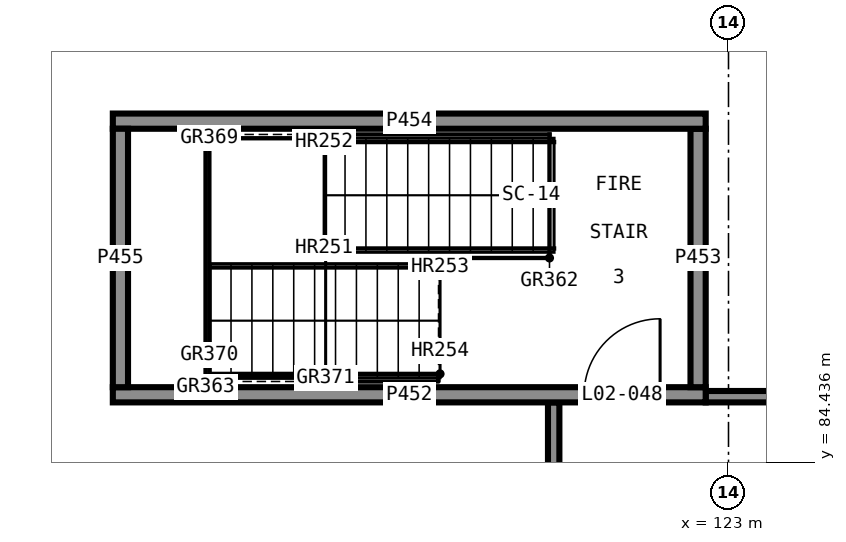
"""IFC4 building model, lengths in metres.
Left out: names, types, materials, properties, quantities, classifications, styles, units other than length and angle.
Written with IfcOpenShell. Run it as: python <this file> out.ifc"""

import sys

from ifc_helpers import new_model, si_unit, direction, frame, frame_2d, origin, place, context, subcontext, project, spatial, rectangle, extrude, element, fill, save


model = new_model("IFC4")
c1 = context("Model", 3, precision=1e-05, world=origin(), true_north=direction((0.0, 1.0)))
c2 = subcontext(c1, "Body", "Model", "MODEL_VIEW")
j1 = project(units=[si_unit("LENGTHUNIT", "METRE"), si_unit("PLANEANGLEUNIT", "RADIAN")], contexts=[c1])
p1 = place(None, origin())
s1 = spatial("IfcSite", under=j1, at=p1, CompositionType="ELEMENT")
p2 = place(p1, origin())
s2 = spatial("IfcBuilding", under=s1, at=p2, CompositionType="ELEMENT")
p3 = place(p2, frame((0.0, 0.0, 9.5)))
s3 = spatial("IfcBuildingStorey", under=s2, at=p3, CompositionType="ELEMENT", Elevation=9.5)
p4 = place(p3, frame((114.9, 85.325, 0.0), z_axis=(0.0, 0.0, 1.0), x_axis=(1.0, 0.0, 0.0)))
e1 = element("IfcWall", 1, at=p4, inside=s3, PredefinedType="SHEAR", context=c2, shape_type="SweptSolid", body=[
    extrude(rectangle(XDim=7.8, YDim=0.2, at=frame_2d((3.9, 0.0))), origin(), (0.0, 0.0, 1.0), 3.75),
])
p5 = place(p4, frame((6.2, 0.0, 0.0)))
e2 = element("IfcOpeningElement", 2, at=p5, cuts=e1, PredefinedType="OPENING", context=c2, shape_type="SweptSolid", body=[
    extrude(rectangle(XDim=1.0, YDim=2.1, at=frame_2d((0.5, 1.05))), frame((0.0, 0.11, 0.0), z_axis=(0.0, -1.0, 0.0), x_axis=(1.0, 0.0, 0.0)), (0.0, 0.0, 1.0), 0.22),
])
p6 = place(p3, frame((122.6, 85.425, 0.0), z_axis=(0.0, 0.0, 1.0), x_axis=(0.0, 1.0, 0.0)))
e3 = element("IfcWall", 3, at=p6, inside=s3, PredefinedType="SHEAR", context=c2, shape_type="SweptSolid", body=[
    extrude(rectangle(XDim=3.4, YDim=0.2, at=frame_2d((1.7, 0.0))), origin(), (0.0, 0.0, 1.0), 3.75),
])
p7 = place(p3, frame((122.7, 88.925, 0.0), z_axis=(0.0, 0.0, 1.0), x_axis=(-1.0, 0.0, 0.0)))
e4 = element("IfcWall", 4, at=p7, inside=s3, PredefinedType="SHEAR", context=c2, shape_type="SweptSolid", body=[
    extrude(rectangle(XDim=7.8, YDim=0.2, at=frame_2d((3.9, 0.0))), origin(), (0.0, 0.0, 1.0), 3.75),
])
p8 = place(p3, frame((115.0, 88.825, 0.0), z_axis=(0.0, 0.0, 1.0), x_axis=(0.0, -1.0, 0.0)))
e5 = element("IfcWall", 5, at=p8, inside=s3, PredefinedType="SHEAR", context=c2, shape_type="SweptSolid", body=[
    extrude(rectangle(XDim=3.4, YDim=0.2, at=frame_2d((1.7, 0.0))), origin(), (0.0, 0.0, 1.0), 3.75),
])
p9 = place(p3, frame((120.7, 62.7, 0.0), z_axis=(0.0, 0.0, 1.0), x_axis=(0.0, 1.0, 0.0)))
e6 = element("IfcWall", 6, at=p9, inside=s3, PredefinedType="PARTITIONING", context=c2, shape_type="SweptSolid", body=[
    extrude(rectangle(XDim=22.525, YDim=0.15, at=frame_2d((11.263, 0.0))), origin(), (0.0, 0.0, 1.0), 3.75),
])
p10 = place(p3, frame((122.7, 85.3, 0.0), z_axis=(0.0, 0.0, 1.0), x_axis=(1.0, 0.0, 0.0)))
e7 = element("IfcWall", 7, at=p10, inside=s3, PredefinedType="PARTITIONING", context=c2, shape_type="SweptSolid", body=[
    extrude(rectangle(XDim=9.9, YDim=0.15, at=frame_2d((4.95, 0.0))), origin(), (0.0, 0.0, 1.0), 3.75),
])
p11 = place(p5, origin())
e8 = element("IfcDoor", 8, at=p11, inside=s3, OperationType="SINGLE_SWING_LEFT", PredefinedType="DOOR", context=c2, shape_type="SweptSolid", body=[
    extrude(rectangle(XDim=1.0, YDim=2.1, at=frame_2d((0.5, 1.05))), frame((0.0, 0.025, 0.0), z_axis=(0.0, -1.0, 0.0), x_axis=(1.0, 0.0, 0.0)), (0.0, 0.0, 1.0), 0.05),
])
fill(e2, e8)
save(model, sys.argv[1])
